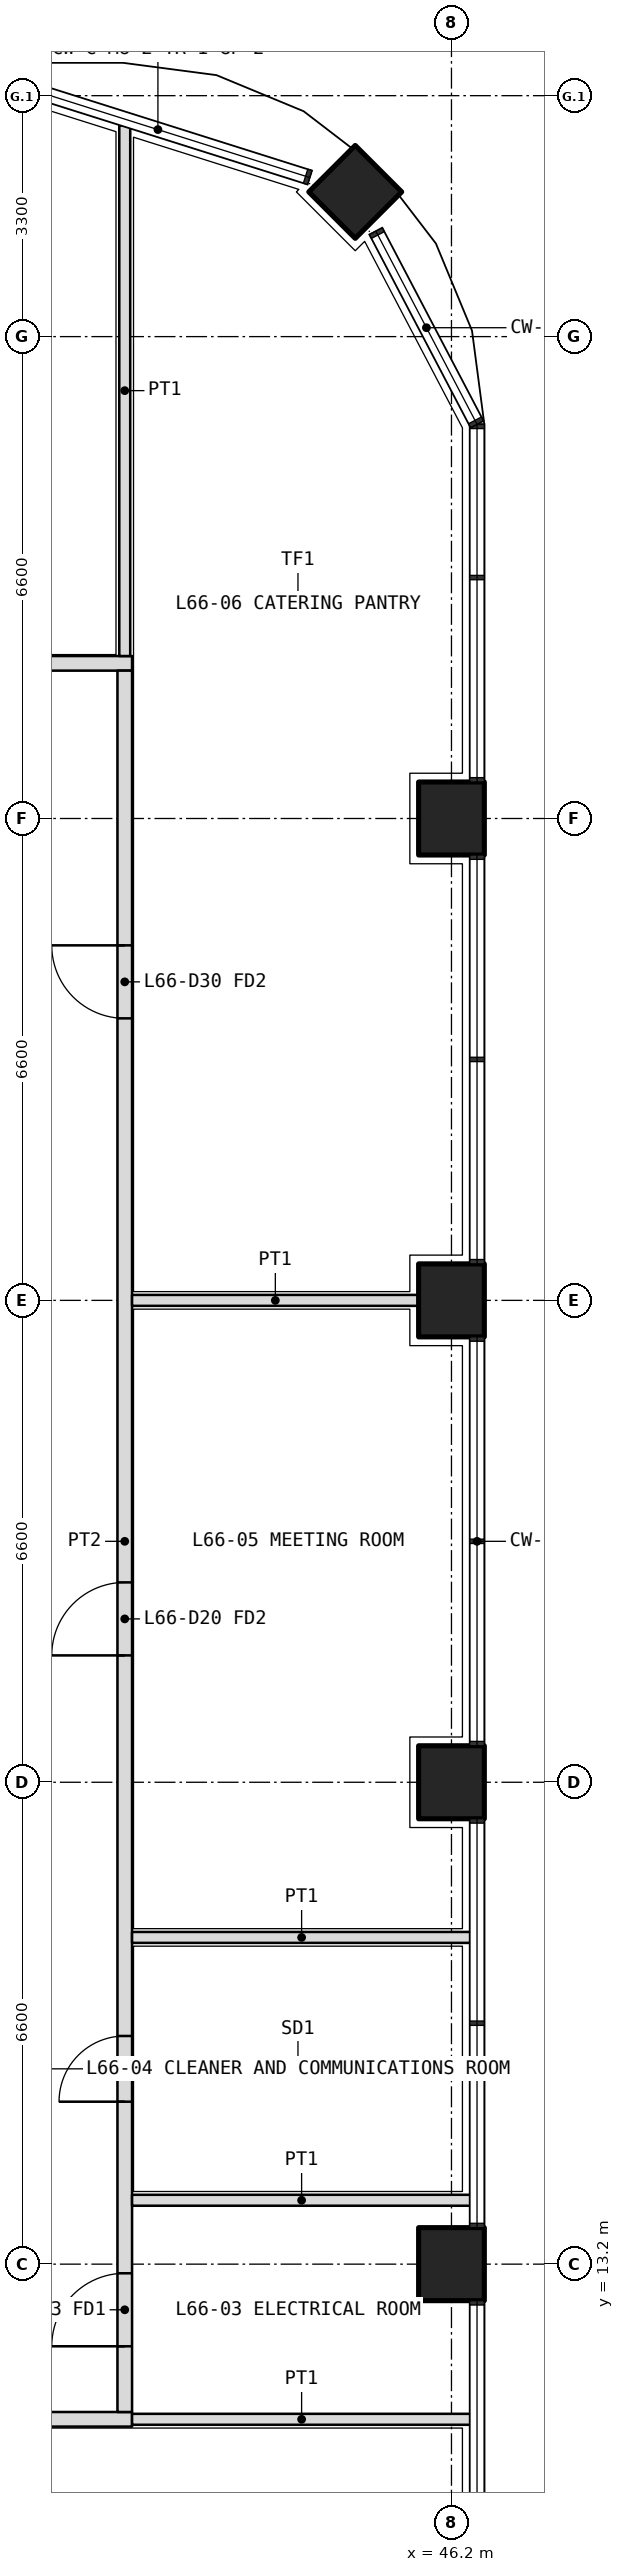
"""IFC4 building model, lengths in metres.
Left out: names, types, materials, properties, quantities, classifications, styles, units other than length and angle.
Written with IfcOpenShell. Run it as: python <this file> out.ifc"""

import sys

from ifc_helpers import new_model, si_unit, direction, frame, frame_2d, origin, origin_2d, place, context, subcontext, project, spatial, rectangle, extrude, element, fill, save


model = new_model("IFC4")
c1 = context("Model", 3, precision=1e-05, world=origin(), true_north=direction((0.0, 1.0)))
c2 = subcontext(c1, "Body", "Model", "MODEL_VIEW")
j1 = project(units=[si_unit("LENGTHUNIT", "METRE"), si_unit("PLANEANGLEUNIT", "RADIAN")], contexts=[c1])
p1 = place(None, origin())
s1 = spatial("IfcSite", under=j1, at=p1, CompositionType="ELEMENT")
p2 = place(p1, origin())
s2 = spatial("IfcBuilding", under=s1, at=p2, CompositionType="ELEMENT")
p3 = place(p2, frame((0.0, 0.0, 288.0)))
s3 = spatial("IfcBuildingStorey", under=s2, at=p3, CompositionType="ELEMENT", Elevation=288.0)
p4 = place(p3, frame((44.882, 41.582, 0.0), z_axis=(0.0, 0.0, 1.0), x_axis=(0.707106781187, 0.707106781187, 0.0)))
e1 = element("IfcColumn", 1, at=p4, inside=s3, PredefinedType="COLUMN", context=c2, shape_type="SweptSolid", body=[
    extrude(rectangle(XDim=0.9, YDim=0.9, at=origin_2d()), origin(), (0.0, 0.0, 1.0), 4.8),
])
for number, where, z_axis, x_axis in (
    (2, (46.2, 13.2, 0.0), (0.0, 0.0, 1.0), (0.0, 1.0, 0.0)),
    (3, (46.2, 19.8, 0.0), (0.0, 0.0, 1.0), (0.0, 1.0, 0.0)),
    (4, (46.2, 26.4, 0.0), (0.0, 0.0, 1.0), (0.0, 1.0, 0.0)),
    (5, (46.2, 33.0, 0.0), (0.0, 0.0, 1.0), (0.0, 1.0, 0.0)),
):
    element("IfcColumn", number, at=place(p3, frame(where, z_axis=z_axis, x_axis=x_axis)), inside=s3, PredefinedType="COLUMN", context=c2, shape_type="SweptSolid", body=[
        extrude(rectangle(XDim=1.0, YDim=0.9, at=origin_2d()), origin(), (0.0, 0.0, 1.0), 4.8),
    ])
p5 = place(p3, frame((10.975, 11.075, 0.0), z_axis=(0.0, 0.0, 1.0), x_axis=(1.0, 0.0, 0.0)))
e6 = element("IfcWall", 6, at=p5, inside=s3, PredefinedType="PARTITIONING", context=c2, shape_type="SweptSolid", body=[
    extrude(rectangle(XDim=30.85, YDim=0.2, at=frame_2d((15.425, 0.0))), origin(), (0.0, 0.0, 1.0), 3.1),
])
p6 = place(p5, frame((10.562, 0.0, 0.0)))
e7 = element("IfcOpeningElement", 7, at=p6, cuts=e6, PredefinedType="OPENING", context=c2, shape_type="SweptSolid", body=[
    extrude(rectangle(XDim=1.0, YDim=2.1, at=frame_2d((0.5, 1.05))), frame((0.0, 0.11, 0.0), z_axis=(0.0, -1.0, 0.0), x_axis=(1.0, 0.0, 0.0)), (0.0, 0.0, 1.0), 0.22),
])
p7 = place(p5, frame((25.887, 0.0, 0.0)))
e8 = element("IfcOpeningElement", 8, at=p7, cuts=e6, PredefinedType="OPENING", context=c2, shape_type="SweptSolid", body=[
    extrude(rectangle(XDim=1.0, YDim=2.1, at=frame_2d((0.5, 1.05))), frame((0.0, 0.11, 0.0), z_axis=(0.0, -1.0, 0.0), x_axis=(1.0, 0.0, 0.0)), (0.0, 0.0, 1.0), 0.22),
])
p8 = place(p3, frame((10.975, 35.125, 0.0), z_axis=(0.0, 0.0, 1.0), x_axis=(1.0, 0.0, 0.0)))
e9 = element("IfcWall", 9, at=p8, inside=s3, PredefinedType="PARTITIONING", context=c2, shape_type="SweptSolid", body=[
    extrude(rectangle(XDim=30.85, YDim=0.2, at=frame_2d((15.425, 0.0))), origin(), (0.0, 0.0, 1.0), 3.1),
])
p9 = place(p8, frame((3.562, 0.0, 0.0)))
e10 = element("IfcOpeningElement", 10, at=p9, cuts=e9, PredefinedType="OPENING", context=c2, shape_type="SweptSolid", body=[
    extrude(rectangle(XDim=1.8, YDim=2.1, at=frame_2d((0.9, 1.05))), frame((0.0, 0.11, 0.0), z_axis=(0.0, -1.0, 0.0), x_axis=(1.0, 0.0, 0.0)), (0.0, 0.0, 1.0), 0.22),
])
p10 = place(p8, frame((14.925, 0.0, 0.0)))
e11 = element("IfcOpeningElement", 11, at=p10, cuts=e9, PredefinedType="OPENING", context=c2, shape_type="SweptSolid", body=[
    extrude(rectangle(XDim=1.0, YDim=2.1, at=frame_2d((0.5, 1.05))), frame((0.0, 0.11, 0.0), z_axis=(0.0, -1.0, 0.0), x_axis=(1.0, 0.0, 0.0)), (0.0, 0.0, 1.0), 0.22),
])
p11 = place(p8, frame((25.887, 0.0, 0.0)))
e12 = element("IfcOpeningElement", 12, at=p11, cuts=e9, PredefinedType="OPENING", context=c2, shape_type="SweptSolid", body=[
    extrude(rectangle(XDim=1.0, YDim=2.1, at=frame_2d((0.5, 1.05))), frame((0.0, 0.11, 0.0), z_axis=(0.0, -1.0, 0.0), x_axis=(1.0, 0.0, 0.0)), (0.0, 0.0, 1.0), 0.22),
])
p12 = place(p3, frame((41.725, 11.175, 0.0), z_axis=(0.0, 0.0, 1.0), x_axis=(0.0, 1.0, 0.0)))
e13 = element("IfcWall", 13, at=p12, inside=s3, PredefinedType="PARTITIONING", context=c2, shape_type="SweptSolid", body=[
    extrude(rectangle(XDim=23.85, YDim=0.2, at=frame_2d((11.925, 0.0))), origin(), (0.0, 0.0, 1.0), 3.1),
])
p13 = place(p12, frame((0.9, 0.0, 0.0)))
e14 = element("IfcOpeningElement", 14, at=p13, cuts=e13, PredefinedType="OPENING", context=c2, shape_type="SweptSolid", body=[
    extrude(rectangle(XDim=1.0, YDim=2.1, at=frame_2d((0.5, 1.05))), frame((0.0, 0.11, 0.0), z_axis=(0.0, -1.0, 0.0), x_axis=(1.0, 0.0, 0.0)), (0.0, 0.0, 1.0), 0.22),
])
p14 = place(p12, frame((4.25, 0.0, 0.0)))
e15 = element("IfcOpeningElement", 15, at=p14, cuts=e13, PredefinedType="OPENING", context=c2, shape_type="SweptSolid", body=[
    extrude(rectangle(XDim=0.9, YDim=2.1, at=frame_2d((0.45, 1.05))), frame((0.0, 0.11, 0.0), z_axis=(0.0, -1.0, 0.0), x_axis=(1.0, 0.0, 0.0)), (0.0, 0.0, 1.0), 0.22),
])
p15 = place(p12, frame((10.363, 0.0, 0.0)))
e16 = element("IfcOpeningElement", 16, at=p15, cuts=e13, PredefinedType="OPENING", context=c2, shape_type="SweptSolid", body=[
    extrude(rectangle(XDim=1.0, YDim=2.1, at=frame_2d((0.5, 1.05))), frame((0.0, 0.11, 0.0), z_axis=(0.0, -1.0, 0.0), x_axis=(1.0, 0.0, 0.0)), (0.0, 0.0, 1.0), 0.22),
])
p16 = place(p12, frame((19.087, 0.0, 0.0)))
e17 = element("IfcOpeningElement", 17, at=p16, cuts=e13, PredefinedType="OPENING", context=c2, shape_type="SweptSolid", body=[
    extrude(rectangle(XDim=1.0, YDim=2.1, at=frame_2d((0.5, 1.05))), frame((0.0, 0.11, 0.0), z_axis=(0.0, -1.0, 0.0), x_axis=(1.0, 0.0, 0.0)), (0.0, 0.0, 1.0), 0.22),
])
p17 = place(p3, frame((46.47, 11.075, 0.0), z_axis=(0.0, 0.0, 1.0), x_axis=(-1.0, 0.0, 0.0)))
e18 = element("IfcWall", 18, at=p17, inside=s3, PredefinedType="PARTITIONING", context=c2, shape_type="SweptSolid", body=[
    extrude(rectangle(XDim=4.645, YDim=0.15, at=frame_2d((2.323, 0.0))), origin(), (0.0, 0.0, 1.0), 3.1),
])
p18 = place(p3, frame((41.725, 42.495, 0.0), z_axis=(0.0, 0.0, 1.0), x_axis=(0.0, -1.0, 0.0)))
e19 = element("IfcWall", 19, at=p18, inside=s3, PredefinedType="PARTITIONING", context=c2, shape_type="SweptSolid", body=[
    extrude(rectangle(XDim=7.27, YDim=0.15, at=frame_2d((3.635, 0.0))), origin(), (0.0, 0.0, 1.0), 3.1),
])
for number, where, z_axis, x_axis in (
    (20, (46.47, 14.075, 0.0), (0.0, 0.0, 1.0), (-1.0, 0.0, 0.0)),
    (21, (46.47, 17.675, 0.0), (0.0, 0.0, 1.0), (-1.0, 0.0, 0.0)),
):
    element("IfcWall", number, at=place(p3, frame(where, z_axis=z_axis, x_axis=x_axis)), inside=s3, PredefinedType="PARTITIONING", context=c2, shape_type="SweptSolid", body=[
        extrude(rectangle(XDim=4.645, YDim=0.15, at=frame_2d((2.323, 0.0))), origin(), (0.0, 0.0, 1.0), 3.2),
    ])
p19 = place(p3, frame((45.75, 26.4, 0.0), z_axis=(0.0, 0.0, 1.0), x_axis=(-1.0, 0.0, 0.0)))
e22 = element("IfcWall", 22, at=p19, inside=s3, PredefinedType="PARTITIONING", context=c2, shape_type="SweptSolid", body=[
    extrude(rectangle(XDim=3.925, YDim=0.15, at=frame_2d((1.962, 0.0))), origin(), (0.0, 0.0, 1.0), 3.1),
])
p20 = place(p13, origin())
e23 = element("IfcDoor", 23, at=p20, inside=s3, OperationType="SINGLE_SWING_LEFT", PredefinedType="DOOR", context=c2, shape_type="SweptSolid", body=[
    extrude(rectangle(XDim=1.0, YDim=2.1, at=frame_2d((0.5, 1.05))), frame((0.0, 0.025, 0.0), z_axis=(0.0, -1.0, 0.0), x_axis=(1.0, 0.0, 0.0)), (0.0, 0.0, 1.0), 0.05),
])
fill(e14, e23)
p21 = place(p14, origin())
e24 = element("IfcDoor", 24, at=p21, inside=s3, OperationType="SINGLE_SWING_LEFT", PredefinedType="DOOR", context=c2, shape_type="SweptSolid", body=[
    extrude(rectangle(XDim=0.9, YDim=2.1, at=frame_2d((0.45, 1.05))), frame((0.0, 0.025, 0.0), z_axis=(0.0, -1.0, 0.0), x_axis=(1.0, 0.0, 0.0)), (0.0, 0.0, 1.0), 0.05),
])
fill(e15, e24)
p22 = place(p15, origin())
e25 = element("IfcDoor", 25, at=p22, inside=s3, OperationType="SINGLE_SWING_LEFT", PredefinedType="DOOR", context=c2, shape_type="SweptSolid", body=[
    extrude(rectangle(XDim=1.0, YDim=2.1, at=frame_2d((0.5, 1.05))), frame((0.0, 0.025, 0.0), z_axis=(0.0, -1.0, 0.0), x_axis=(1.0, 0.0, 0.0)), (0.0, 0.0, 1.0), 0.05),
])
fill(e16, e25)
p23 = place(p16, origin())
e26 = element("IfcDoor", 26, at=p23, inside=s3, OperationType="SINGLE_SWING_RIGHT", PredefinedType="DOOR", context=c2, shape_type="SweptSolid", body=[
    extrude(rectangle(XDim=1.0, YDim=2.1, at=frame_2d((0.5, 1.05))), frame((0.0, 0.025, 0.0), z_axis=(0.0, -1.0, 0.0), x_axis=(1.0, 0.0, 0.0)), (0.0, 0.0, 1.0), 0.05),
])
fill(e17, e26)
save(model, sys.argv[1])
